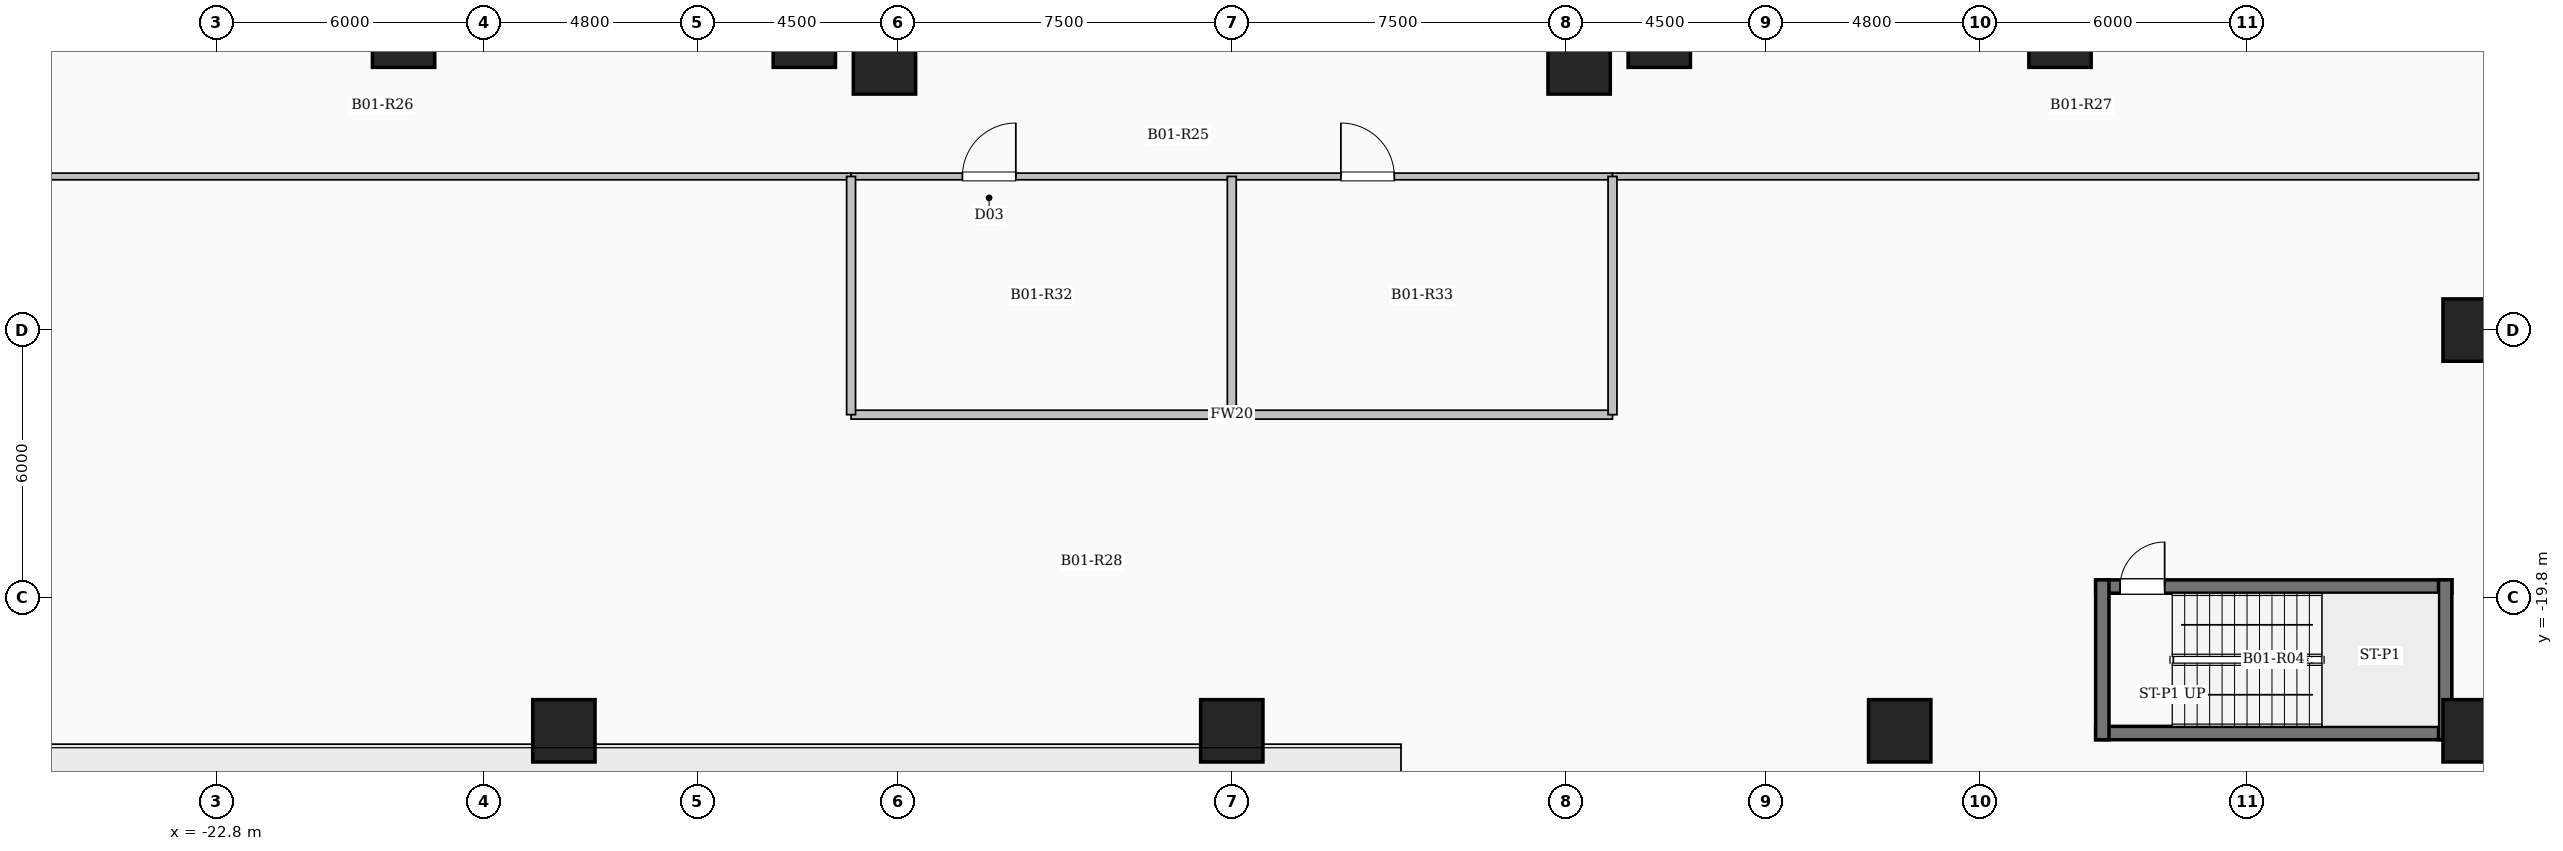
"""IFC4 building model, lengths in metres.
Left out: names, types, materials, properties, quantities, classifications, styles, units other than length and angle.
Written with IfcOpenShell. Run it as: python <this file> out.ifc"""

import sys

from ifc_helpers import new_model, si_unit, direction, frame, frame_2d, origin, origin_2d, place, context, subcontext, project, spatial, rectangle, extrude, element, fill, save


model = new_model("IFC4")
c1 = context("Model", 3, precision=1e-05, world=origin(), true_north=direction((0.0, 1.0)))
c2 = subcontext(c1, "Body", "Model", "MODEL_VIEW")
j1 = project(units=[si_unit("LENGTHUNIT", "METRE"), si_unit("PLANEANGLEUNIT", "RADIAN")], contexts=[c1])
p1 = place(None, origin())
s1 = spatial("IfcSite", under=j1, at=p1, CompositionType="ELEMENT")
p2 = place(p1, origin())
s2 = spatial("IfcBuilding", under=s1, at=p2, CompositionType="ELEMENT")
p3 = place(p2, frame((0.0, 0.0, -4.6)))
s3 = spatial("IfcBuildingStorey", under=s2, at=p3, CompositionType="ELEMENT", Elevation=-4.6)
for number, where, z_axis, x_axis in (
    (1, (-7.8, -7.8, 0.0), (0.0, 0.0, 1.0), (1.0, 0.0, 0.0)),
    (2, (7.8, -7.8, 0.0), (0.0, 0.0, 1.0), (1.0, 0.0, 0.0)),
    (3, (-9.6, -7.2, 0.0), (0.0, 0.0, 1.0), (1.0, 0.0, 0.0)),
    (4, (9.6, -7.2, 0.0), (0.0, 0.0, 1.0), (1.0, 0.0, 0.0)),
    (5, (-18.6, -7.2, 0.0), (0.0, 0.0, 1.0), (1.0, 0.0, 0.0)),
    (6, (18.6, -7.2, 0.0), (0.0, 0.0, 1.0), (1.0, 0.0, 0.0)),
    (7, (-15.0, -22.8, 0.0), (0.0, 0.0, 1.0), (1.0, 0.0, 0.0)),
    (8, (0.0, -22.8, 0.0), (0.0, 0.0, 1.0), (1.0, 0.0, 0.0)),
    (9, (15.0, -22.8, 0.0), (0.0, 0.0, 1.0), (1.0, 0.0, 0.0)),
    (10, (27.9, -22.8, 0.0), (0.0, 0.0, 1.0), (1.0, 0.0, 0.0)),
    (11, (27.9, -13.8, 0.0), (0.0, 0.0, 1.0), (1.0, 0.0, 0.0)),
):
    element("IfcColumn", number, at=place(p3, frame(where, z_axis=z_axis, x_axis=x_axis)), inside=s3, PredefinedType="COLUMN", context=c2, shape_type="SweptSolid", body=[
        extrude(rectangle(XDim=1.4, YDim=1.4, at=origin_2d()), origin(), (0.0, 0.0, 1.0), 4.6),
    ])
p4 = place(p3, frame((19.4, -19.56, 0.0), z_axis=(0.0, 0.0, 1.0), x_axis=(1.0, 0.0, 0.0)))
e12 = element("IfcWall", 12, at=p4, inside=s3, PredefinedType="SHEAR", context=c2, shape_type="SweptSolid", body=[
    extrude(rectangle(XDim=8.0, YDim=0.3, at=frame_2d((4.0, 0.0))), origin(), (0.0, 0.0, 1.0), 4.6),
])
p5 = place(p4, frame((0.55, 0.0, 0.0)))
e13 = element("IfcOpeningElement", 13, at=p5, cuts=e12, PredefinedType="OPENING", context=c2, shape_type="SweptSolid", body=[
    extrude(rectangle(XDim=1.0, YDim=2.15, at=frame_2d((0.5, 1.075))), frame((0.0, 0.16, 0.0), z_axis=(0.0, -1.0, 0.0), x_axis=(1.0, 0.0, 0.0)), (0.0, 0.0, 1.0), 0.32),
])
p6 = place(p3, frame((19.4, -22.85, 0.0), z_axis=(0.0, 0.0, 1.0), x_axis=(1.0, 0.0, 0.0)))
e14 = element("IfcWall", 14, at=p6, inside=s3, PredefinedType="SHEAR", context=c2, shape_type="SweptSolid", body=[
    extrude(rectangle(XDim=8.0, YDim=0.3, at=frame_2d((4.0, 0.0))), origin(), (0.0, 0.0, 1.0), 4.6),
])
for number, where, z_axis, x_axis in (
    (15, (19.55, -23.0, 0.0), (0.0, 0.0, 1.0), (0.0, 1.0, 0.0)),
    (16, (27.25, -23.0, 0.0), (0.0, 0.0, 1.0), (0.0, 1.0, 0.0)),
):
    element("IfcWall", number, at=place(p3, frame(where, z_axis=z_axis, x_axis=x_axis)), inside=s3, PredefinedType="SHEAR", context=c2, shape_type="SweptSolid", body=[
        extrude(rectangle(XDim=3.59, YDim=0.3, at=frame_2d((1.795, 0.0))), origin(), (0.0, 0.0, 1.0), 4.6),
    ])
p7 = place(p3, frame((-28.0, -10.35, 0.0), z_axis=(0.0, 0.0, 1.0), x_axis=(1.0, 0.0, 0.0)))
e17 = element("IfcWall", 17, at=p7, inside=s3, PredefinedType="PARTITIONING", context=c2, shape_type="SweptSolid", body=[
    extrude(rectangle(XDim=19.45, YDim=0.15, at=frame_2d((9.725, 0.0))), origin(), (0.0, 0.0, 1.0), 4.3),
])
p8 = place(p3, frame((-8.55, -10.35, 0.0), z_axis=(0.0, 0.0, 1.0), x_axis=(1.0, 0.0, 0.0)))
e18 = element("IfcWall", 18, at=p8, inside=s3, PredefinedType="PARTITIONING", context=c2, shape_type="SweptSolid", body=[
    extrude(rectangle(XDim=17.1, YDim=0.15, at=frame_2d((8.55, 0.0))), origin(), (0.0, 0.0, 1.0), 4.3),
])
p9 = place(p8, frame((2.5, 0.0, 0.0)))
e19 = element("IfcOpeningElement", 19, at=p9, cuts=e18, PredefinedType="OPENING", context=c2, shape_type="SweptSolid", body=[
    extrude(rectangle(XDim=1.2, YDim=2.2, at=frame_2d((0.6, 1.1))), frame((0.0, 0.085, 0.0), z_axis=(0.0, -1.0, 0.0), x_axis=(1.0, 0.0, 0.0)), (0.0, 0.0, 1.0), 0.17),
])
p10 = place(p8, frame((11.0, 0.0, 0.0)))
e20 = element("IfcOpeningElement", 20, at=p10, cuts=e18, PredefinedType="OPENING", context=c2, shape_type="SweptSolid", body=[
    extrude(rectangle(XDim=1.2, YDim=2.2, at=frame_2d((0.6, 1.1))), frame((0.0, 0.085, 0.0), z_axis=(0.0, -1.0, 0.0), x_axis=(1.0, 0.0, 0.0)), (0.0, 0.0, 1.0), 0.17),
])
p11 = place(p3, frame((8.55, -10.35, 0.0), z_axis=(0.0, 0.0, 1.0), x_axis=(1.0, 0.0, 0.0)))
e21 = element("IfcWall", 21, at=p11, inside=s3, PredefinedType="PARTITIONING", context=c2, shape_type="SweptSolid", body=[
    extrude(rectangle(XDim=19.45, YDim=0.15, at=frame_2d((9.725, 0.0))), origin(), (0.0, 0.0, 1.0), 4.3),
])
p12 = place(p3, frame((-8.55, -15.7, 0.0), z_axis=(0.0, 0.0, 1.0), x_axis=(1.0, 0.0, 0.0)))
e22 = element("IfcWall", 22, at=p12, inside=s3, PredefinedType="SOLIDWALL", context=c2, shape_type="SweptSolid", body=[
    extrude(rectangle(XDim=17.1, YDim=0.2, at=frame_2d((8.55, 0.0))), origin(), (0.0, 0.0, 1.0), 4.3),
])
for number, where, z_axis, x_axis in (
    (23, (-8.55, -15.7, 0.0), (0.0, 0.0, 1.0), (0.0, 1.0, 0.0)),
    (24, (8.55, -15.7, 0.0), (0.0, 0.0, 1.0), (0.0, 1.0, 0.0)),
    (25, (0.0, -15.7, 0.0), (0.0, 0.0, 1.0), (0.0, 1.0, 0.0)),
):
    element("IfcWall", number, at=place(p3, frame(where, z_axis=z_axis, x_axis=x_axis)), inside=s3, PredefinedType="SOLIDWALL", context=c2, shape_type="SweptSolid", body=[
        extrude(rectangle(XDim=5.35, YDim=0.2, at=frame_2d((2.675, 0.0))), origin(), (0.0, 0.0, 1.0), 4.3),
    ])
p13 = place(p5, origin())
e26 = element("IfcDoor", 26, at=p13, inside=s3, OperationType="SINGLE_SWING_RIGHT", PredefinedType="DOOR", context=c2, shape_type="SweptSolid", body=[
    extrude(rectangle(XDim=1.0, YDim=2.15, at=frame_2d((0.5, 1.075))), frame((0.0, 0.025, 0.0), z_axis=(0.0, -1.0, 0.0), x_axis=(1.0, 0.0, 0.0)), (0.0, 0.0, 1.0), 0.05),
])
fill(e13, e26)
p14 = place(p9, origin())
e27 = element("IfcDoor", 27, at=p14, inside=s3, OperationType="SINGLE_SWING_RIGHT", PredefinedType="DOOR", context=c2, shape_type="SweptSolid", body=[
    extrude(rectangle(XDim=1.2, YDim=2.2, at=frame_2d((0.6, 1.1))), frame((0.0, 0.025, 0.0), z_axis=(0.0, -1.0, 0.0), x_axis=(1.0, 0.0, 0.0)), (0.0, 0.0, 1.0), 0.05),
])
fill(e19, e27)
p15 = place(p10, origin())
e28 = element("IfcDoor", 28, at=p15, inside=s3, OperationType="SINGLE_SWING_LEFT", PredefinedType="DOOR", context=c2, shape_type="SweptSolid", body=[
    extrude(rectangle(XDim=1.2, YDim=2.2, at=frame_2d((0.6, 1.1))), frame((0.0, 0.025, 0.0), z_axis=(0.0, -1.0, 0.0), x_axis=(1.0, 0.0, 0.0)), (0.0, 0.0, 1.0), 0.05),
])
fill(e20, e28)
save(model, sys.argv[1])
